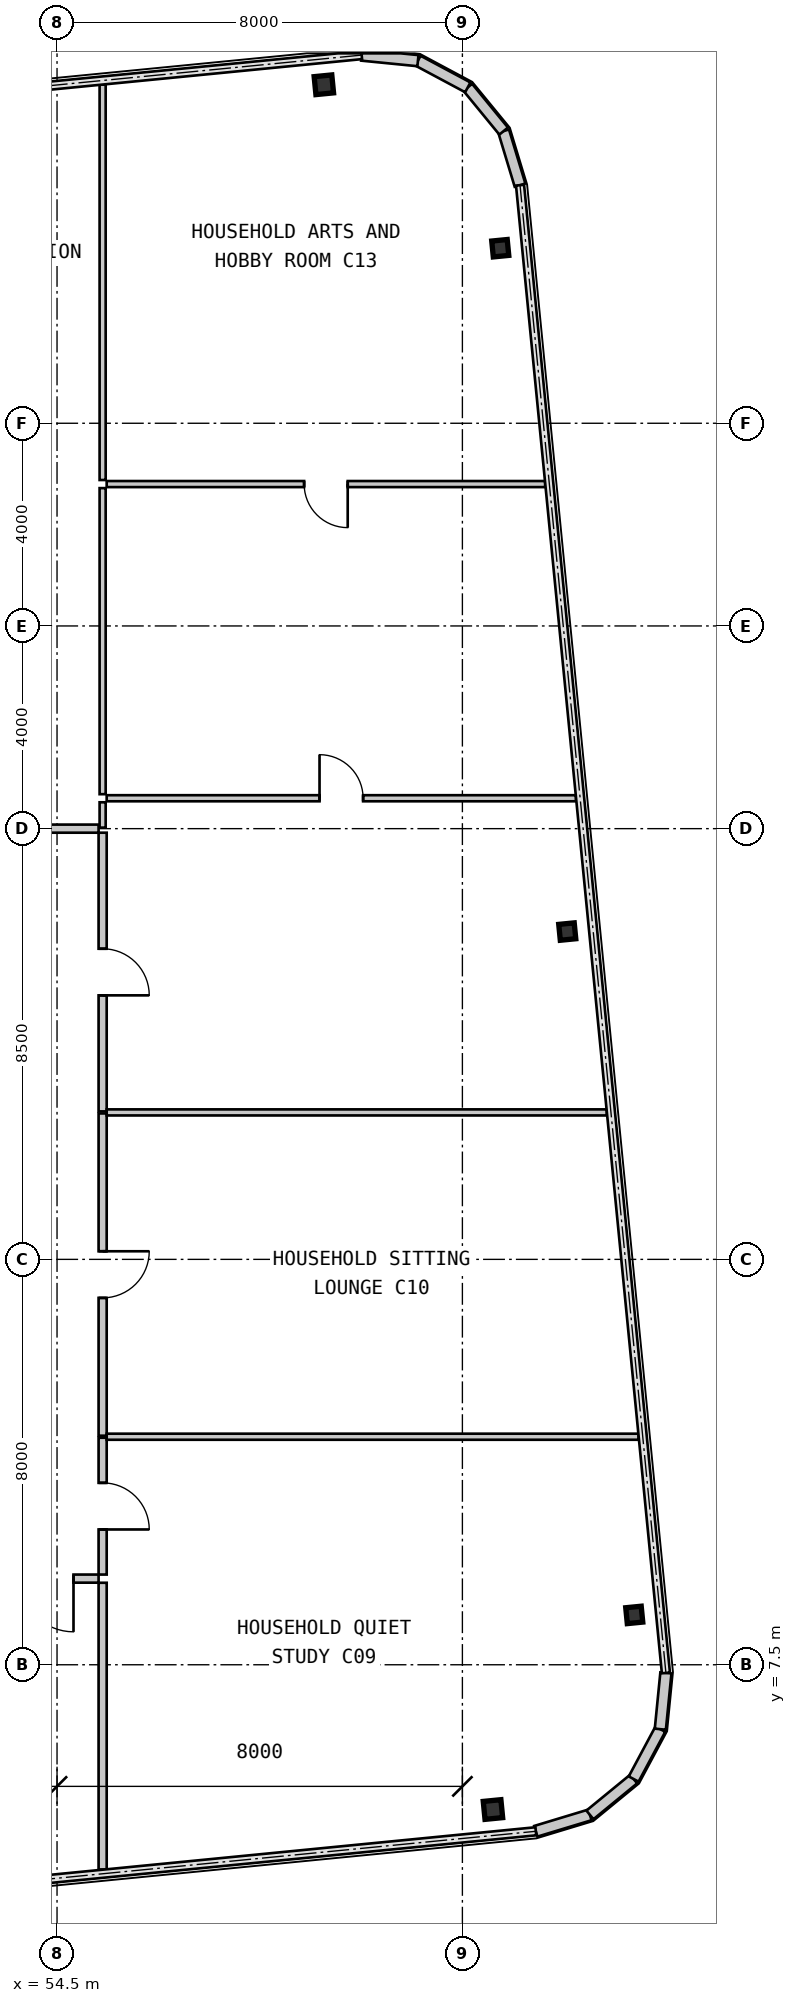
"""IFC4 building model, lengths in metres.
Left out: names, types, materials, properties, quantities, classifications, styles, units other than length and angle.
Written with IfcOpenShell. Run it as: python <this file> out.ifc"""

import sys

from ifc_helpers import new_model, si_unit, direction, frame, frame_2d, origin, origin_2d, place, context, subcontext, project, spatial, rectangle, i_section, extrude, source, transform, mapped, element, fill, save


model = new_model("IFC4")
c1 = context("Model", 3, precision=1e-05, world=origin(), true_north=direction((0.0, 1.0)))
c2 = subcontext(c1, "Body", "Model", "MODEL_VIEW")
j1 = project(units=[si_unit("LENGTHUNIT", "METRE"), si_unit("PLANEANGLEUNIT", "RADIAN")], contexts=[c1])
p1 = place(None, origin())
s1 = spatial("IfcSite", under=j1, at=p1, CompositionType="ELEMENT")
p2 = place(p1, origin())
s2 = spatial("IfcBuilding", under=s1, at=p2, CompositionType="ELEMENT")
p3 = place(p2, frame((0.0, 0.0, 74.55)))
s3 = spatial("IfcBuildingStorey", under=s2, at=p3, CompositionType="ELEMENT", Elevation=74.55)
m1 = source(origin(), c2, "Body", "SweptSolid", [
    extrude(i_section(OverallWidth=0.35, OverallDepth=0.356, WebThickness=0.018, FlangeThickness=0.028, at=origin_2d()), origin(), (0.0, 0.0, 1.0), 3.15),
])
for number, where, z_axis, x_axis in (
    (1, (63.103, 4.643, 0.0), (0.0, 0.0, 1.0), (0.995, 0.098, 0.0)),
    (2, (59.766, 38.68, 0.0), (0.0, 0.0, 1.0), (0.995, 0.098, 0.0)),
):
    element("IfcColumn", number, at=place(p3, frame(where, z_axis=z_axis, x_axis=x_axis)), inside=s3, PredefinedType="COLUMN", context=c2, shape_type="MappedRepresentation", body=[
        mapped(m1, transform((0.0, 0.0, 0.0), scale=1.0)),
    ])
m2 = source(origin(), c2, "Body", "SweptSolid", [
    extrude(i_section(OverallWidth=0.307, OverallDepth=0.315, WebThickness=0.012, FlangeThickness=0.019, at=origin_2d()), origin(), (0.0, 0.0, 1.0), 3.15),
])
for number, where, z_axis, x_axis in (
    (3, (65.892, 8.484, 0.0), (0.0, 0.0, 1.0), (0.995, 0.098, 0.0)),
    (4, (64.57, 21.969, 0.0), (0.0, 0.0, 1.0), (0.995, 0.098, 0.0)),
    (5, (63.247, 35.454, 0.0), (0.0, 0.0, 1.0), (0.995, 0.098, 0.0)),
):
    element("IfcColumn", number, at=place(p3, frame(where, z_axis=z_axis, x_axis=x_axis)), inside=s3, PredefinedType="COLUMN", context=c2, shape_type="MappedRepresentation", body=[
        mapped(m2, transform((0.0, 0.0, 0.0), scale=1.0)),
    ])
m3 = source(origin(), c2, "Body", "SweptSolid", [
    extrude(rectangle(XDim=1.116, YDim=0.22, at=frame_2d((0.558, 0.0))), origin(), (0.0, 0.0, 1.0), 2.93),
])
p4 = place(p3, frame((63.949, 4.214, 0.0), z_axis=(0.0, 0.0, 1.0), x_axis=(0.957052003726, 0.289916301997, 0.0)))
e6 = element("IfcWall", 6, at=p4, inside=s3, PredefinedType="SOLIDWALL", context=c2, shape_type="MappedRepresentation", body=[
    mapped(m3, transform((0.0, 0.0, 0.0), scale=1.0)),
])
m4 = source(origin(), c2, "Body", "SweptSolid", [
    extrude(rectangle(XDim=1.116, YDim=0.22, at=frame_2d((0.558, 0.0))), origin(), (0.0, 0.0, 1.0), 2.93),
])
p5 = place(p3, frame((65.017, 4.537, 0.0), z_axis=(0.0, 0.0, 1.0), x_axis=(0.773342870285, 0.633988016432, 0.0)))
e7 = element("IfcWall", 7, at=p5, inside=s3, PredefinedType="SOLIDWALL", context=c2, shape_type="MappedRepresentation", body=[
    mapped(m4, transform((0.0, 0.0, 0.0), scale=1.0)),
])
p6 = place(p3, frame((65.88, 5.245, 0.0), z_axis=(0.0, 0.0, 1.0), x_axis=(0.471723463201, 0.881746547635, 0.0)))
e8 = element("IfcWall", 8, at=p6, inside=s3, PredefinedType="SOLIDWALL", context=c2, shape_type="MappedRepresentation", body=[
    mapped(m3, transform((0.0, 0.0, 0.0), scale=1.0)),
])
for number, where, z_axis, x_axis in (
    (9, (66.406, 6.229, 0.0), (0.0, 0.0, 1.0), (0.098, 0.995, 0.0)),
    (10, (63.638, 36.698, 0.0), (0.0, 0.0, 1.0), (-0.29, 0.957, 0.0)),
):
    element("IfcWall", number, at=place(p3, frame(where, z_axis=z_axis, x_axis=x_axis)), inside=s3, PredefinedType="SOLIDWALL", context=c2, shape_type="MappedRepresentation", body=[
        mapped(m4, transform((0.0, 0.0, 0.0), scale=1.0)),
    ])
p7 = place(p3, frame((63.314, 37.766, 0.0), z_axis=(0.0, 0.0, 1.0), x_axis=(-0.634095287989, 0.773254916409, 0.0)))
e11 = element("IfcWall", 11, at=p7, inside=s3, PredefinedType="SOLIDWALL", context=c2, shape_type="MappedRepresentation", body=[
    mapped(m3, transform((0.0, 0.0, 0.0), scale=1.0)),
])
for number, where, z_axis, x_axis in (
    (12, (62.607, 38.629, 0.0), (0.0, 0.0, 1.0), (-0.882, 0.472, 0.0)),
    (13, (61.623, 39.156, 0.0), (0.0, 0.0, 1.0), (-0.995, 0.098, 0.0)),
):
    element("IfcWall", number, at=place(p3, frame(where, z_axis=z_axis, x_axis=x_axis)), inside=s3, PredefinedType="SOLIDWALL", context=c2, shape_type="MappedRepresentation", body=[
        mapped(m4, transform((0.0, 0.0, 0.0), scale=1.0)),
    ])
m5 = source(origin(), c2, "Body", "SweptSolid", [
    extrude(rectangle(XDim=2.04, YDim=0.16, at=frame_2d((1.02, 0.0))), origin(), (0.0, 0.0, 1.0), 2.93),
])
p8 = place(p3, frame((55.32, 9.2, 0.0), z_axis=(0.0, 0.0, 1.0), x_axis=(-1.0, 0.0, 0.0)))
e14 = element("IfcWall", 14, at=p8, inside=s3, PredefinedType="PARTITIONING", context=c2, shape_type="MappedRepresentation", body=[
    mapped(m5, transform((0.0, 0.0, 0.0), scale=1.0)),
])
m6 = source(origin(), c2, "Body", "SweptSolid", [
    extrude(rectangle(XDim=1.05, YDim=2.1, at=frame_2d((0.525, 1.05))), frame((0.0, 0.09, 0.0), z_axis=(0.0, -1.0, 0.0), x_axis=(1.0, 0.0, 0.0)), (0.0, 0.0, 1.0), 0.18),
])
p9 = place(p8, frame((0.495, 0.0, 0.0)))
e15 = element("IfcOpeningElement", 15, at=p9, cuts=e14, PredefinedType="OPENING", context=c2, shape_type="MappedRepresentation", body=[
    mapped(m6, transform((0.0, 0.0, 0.0), scale=1.0)),
])
m7 = source(origin(), c2, "Body", "SweptSolid", [
    extrude(rectangle(XDim=2.7, YDim=0.16, at=frame_2d((1.35, 0.0))), origin(), (0.0, 0.0, 1.0), 2.93),
])
p10 = place(p3, frame((55.4, 11.98, 0.0), z_axis=(0.0, 0.0, 1.0), x_axis=(0.0, -1.0, 0.0)))
e16 = element("IfcWall", 16, at=p10, inside=s3, PredefinedType="PARTITIONING", context=c2, shape_type="MappedRepresentation", body=[
    mapped(m7, transform((0.0, 0.0, 0.0), scale=1.0)),
])
m8 = source(origin(), c2, "Body", "SweptSolid", [
    extrude(rectangle(XDim=0.92, YDim=2.1, at=frame_2d((0.46, 1.05))), frame((0.0, 0.09, 0.0), z_axis=(0.0, -1.0, 0.0), x_axis=(1.0, 0.0, 0.0)), (0.0, 0.0, 1.0), 0.18),
])
p11 = place(p10, frame((0.89, 0.0, 0.0)))
e17 = element("IfcOpeningElement", 17, at=p11, cuts=e16, PredefinedType="OPENING", context=c2, shape_type="MappedRepresentation", body=[
    mapped(m8, transform((0.0, 0.0, 0.0), scale=1.0)),
])
m9 = source(origin(), c2, "Body", "SweptSolid", [
    extrude(rectangle(XDim=6.36, YDim=0.16, at=frame_2d((3.18, 0.0))), origin(), (0.0, 0.0, 1.0), 2.93),
])
p12 = place(p3, frame((55.4, 18.38, 0.0), z_axis=(0.0, 0.0, 1.0), x_axis=(0.0, -1.0, 0.0)))
e18 = element("IfcWall", 18, at=p12, inside=s3, PredefinedType="PARTITIONING", context=c2, shape_type="MappedRepresentation", body=[
    mapped(m9, transform((0.0, 0.0, 0.0), scale=1.0)),
])
p13 = place(p12, frame((2.72, 0.0, 0.0)))
e19 = element("IfcOpeningElement", 19, at=p13, cuts=e18, PredefinedType="OPENING", context=c2, shape_type="MappedRepresentation", body=[
    mapped(m8, transform((0.0, 0.0, 0.0), scale=1.0)),
])
m10 = source(origin(), c2, "Body", "SweptSolid", [
    extrude(rectangle(XDim=5.5, YDim=0.16, at=frame_2d((2.75, 0.0))), origin(), (0.0, 0.0, 1.0), 2.93),
])
p14 = place(p3, frame((55.4, 23.92, 0.0), z_axis=(0.0, 0.0, 1.0), x_axis=(0.0, -1.0, 0.0)))
e20 = element("IfcWall", 20, at=p14, inside=s3, PredefinedType="PARTITIONING", context=c2, shape_type="MappedRepresentation", body=[
    mapped(m10, transform((0.0, 0.0, 0.0), scale=1.0)),
])
p15 = place(p14, frame((2.29, 0.0, 0.0)))
e21 = element("IfcOpeningElement", 21, at=p15, cuts=e20, PredefinedType="OPENING", context=c2, shape_type="MappedRepresentation", body=[
    mapped(m8, transform((0.0, 0.0, 0.0), scale=1.0)),
])
m11 = source(origin(), c2, "Body", "SweptSolid", [
    extrude(rectangle(XDim=3.016, YDim=0.16, at=frame_2d((1.508, 0.0))), origin(), (0.0, 0.0, 1.0), 2.93),
])
p16 = place(p3, frame((52.304, 24.0, 0.0), z_axis=(0.0, 0.0, 1.0), x_axis=(1.0, 0.0, 0.0)))
e22 = element("IfcWall", 22, at=p16, inside=s3, PredefinedType="PARTITIONING", context=c2, shape_type="MappedRepresentation", body=[
    mapped(m11, transform((0.0, 0.0, 0.0), scale=1.0)),
])
m12 = source(origin(), c2, "Body", "SweptSolid", [
    extrude(rectangle(XDim=5.658, YDim=0.16, at=frame_2d((2.829, 0.0))), origin(), (0.0, 0.0, 1.0), 2.93),
])
p17 = place(p3, frame((55.4, 9.118, 0.0), z_axis=(0.0, 0.0, 1.0), x_axis=(0.0, -1.0, 0.0)))
e23 = element("IfcWall", 23, at=p17, inside=s3, PredefinedType="PARTITIONING", context=c2, shape_type="MappedRepresentation", body=[
    mapped(m12, transform((0.0, 0.0, 0.0), scale=1.0)),
])
m13 = source(origin(), c2, "Body", "SweptSolid", [
    extrude(rectangle(XDim=10.497, YDim=0.12, at=frame_2d((5.249, 0.0))), origin(), (0.0, 0.0, 1.0), 2.93),
])
p18 = place(p3, frame((55.48, 12.0, 0.0), z_axis=(0.0, 0.0, 1.0), x_axis=(1.0, 0.0, 0.0)))
e24 = element("IfcWall", 24, at=p18, inside=s3, PredefinedType="PARTITIONING", context=c2, shape_type="MappedRepresentation", body=[
    mapped(m13, transform((0.0, 0.0, 0.0), scale=1.0)),
])
m14 = source(origin(), c2, "Body", "SweptSolid", [
    extrude(rectangle(XDim=9.869, YDim=0.12, at=frame_2d((4.935, 0.0))), origin(), (0.0, 0.0, 1.0), 2.93),
])
p19 = place(p3, frame((55.48, 18.4, 0.0), z_axis=(0.0, 0.0, 1.0), x_axis=(1.0, 0.0, 0.0)))
e25 = element("IfcWall", 25, at=p19, inside=s3, PredefinedType="PARTITIONING", context=c2, shape_type="MappedRepresentation", body=[
    mapped(m14, transform((0.0, 0.0, 0.0), scale=1.0)),
])
m15 = source(origin(), c2, "Body", "SweptSolid", [
    extrude(rectangle(XDim=9.261, YDim=0.12, at=frame_2d((4.631, 0.0))), origin(), (0.0, 0.0, 1.0), 2.93),
])
p20 = place(p3, frame((55.48, 24.6, 0.0), z_axis=(0.0, 0.0, 1.0), x_axis=(1.0, 0.0, 0.0)))
e26 = element("IfcWall", 26, at=p20, inside=s3, PredefinedType="PARTITIONING", context=c2, shape_type="MappedRepresentation", body=[
    mapped(m15, transform((0.0, 0.0, 0.0), scale=1.0)),
])
m16 = source(origin(), c2, "Body", "SweptSolid", [
    extrude(rectangle(XDim=0.86, YDim=2.1, at=frame_2d((0.43, 1.05))), frame((0.0, 0.07, 0.0), z_axis=(0.0, -1.0, 0.0), x_axis=(1.0, 0.0, 0.0)), (0.0, 0.0, 1.0), 0.14),
])
p21 = place(p20, frame((4.201, 0.0, 0.0)))
e27 = element("IfcOpeningElement", 27, at=p21, cuts=e26, PredefinedType="OPENING", context=c2, shape_type="MappedRepresentation", body=[
    mapped(m16, transform((0.0, 0.0, 0.0), scale=1.0)),
])
m17 = source(origin(), c2, "Body", "SweptSolid", [
    extrude(rectangle(XDim=0.5, YDim=0.12, at=frame_2d((0.25, 0.0))), origin(), (0.0, 0.0, 1.0), 2.93),
])
p22 = place(p3, frame((55.4, 24.02, 0.0), z_axis=(0.0, 0.0, 1.0), x_axis=(0.0, 1.0, 0.0)))
e28 = element("IfcWall", 28, at=p22, inside=s3, PredefinedType="PARTITIONING", context=c2, shape_type="MappedRepresentation", body=[
    mapped(m17, transform((0.0, 0.0, 0.0), scale=1.0)),
])
m18 = source(origin(), c2, "Body", "SweptSolid", [
    extrude(rectangle(XDim=8.653, YDim=0.12, at=frame_2d((4.327, 0.0))), origin(), (0.0, 0.0, 1.0), 2.93),
])
p23 = place(p3, frame((55.48, 30.8, 0.0), z_axis=(0.0, 0.0, 1.0), x_axis=(1.0, 0.0, 0.0)))
e29 = element("IfcWall", 29, at=p23, inside=s3, PredefinedType="PARTITIONING", context=c2, shape_type="MappedRepresentation", body=[
    mapped(m18, transform((0.0, 0.0, 0.0), scale=1.0)),
])
p24 = place(p23, frame((3.897, 0.0, 0.0)))
e30 = element("IfcOpeningElement", 30, at=p24, cuts=e29, PredefinedType="OPENING", context=c2, shape_type="MappedRepresentation", body=[
    mapped(m16, transform((0.0, 0.0, 0.0), scale=1.0)),
])
m19 = source(origin(), c2, "Body", "SweptSolid", [
    extrude(rectangle(XDim=6.04, YDim=0.12, at=frame_2d((3.02, 0.0))), origin(), (0.0, 0.0, 1.0), 2.93),
])
p25 = place(p3, frame((55.4, 24.68, 0.0), z_axis=(0.0, 0.0, 1.0), x_axis=(0.0, 1.0, 0.0)))
e31 = element("IfcWall", 31, at=p25, inside=s3, PredefinedType="PARTITIONING", context=c2, shape_type="MappedRepresentation", body=[
    mapped(m19, transform((0.0, 0.0, 0.0), scale=1.0)),
])
m20 = source(origin(), c2, "Body", "SweptSolid", [
    extrude(rectangle(XDim=7.802, YDim=0.12, at=frame_2d((3.901, 0.0))), origin(), (0.0, 0.0, 1.0), 2.93),
])
p26 = place(p3, frame((55.4, 30.88, 0.0), z_axis=(0.0, 0.0, 1.0), x_axis=(0.0, 1.0, 0.0)))
e32 = element("IfcWall", 32, at=p26, inside=s3, PredefinedType="PARTITIONING", context=c2, shape_type="MappedRepresentation", body=[
    mapped(m20, transform((0.0, 0.0, 0.0), scale=1.0)),
])
m21 = source(origin(), c2, "Body", "SweptSolid", [
    extrude(rectangle(XDim=1.05, YDim=2.1, at=frame_2d((0.525, 1.05))), frame((0.0, 0.025, 0.0), z_axis=(0.0, -1.0, 0.0), x_axis=(1.0, 0.0, 0.0)), (0.0, 0.0, 1.0), 0.05),
])
p27 = place(p9, origin())
e33 = element("IfcDoor", 33, at=p27, inside=s3, OperationType="SINGLE_SWING_LEFT", PredefinedType="DOOR", context=c2, shape_type="MappedRepresentation", body=[
    mapped(m21, transform((0.0, 0.0, 0.0), scale=1.0)),
])
fill(e15, e33)
m22 = source(origin(), c2, "Body", "SweptSolid", [
    extrude(rectangle(XDim=0.92, YDim=2.1, at=frame_2d((0.46, 1.05))), frame((0.0, 0.025, 0.0), z_axis=(0.0, -1.0, 0.0), x_axis=(1.0, 0.0, 0.0)), (0.0, 0.0, 1.0), 0.05),
])
p28 = place(p11, origin())
e34 = element("IfcDoor", 34, at=p28, inside=s3, OperationType="SINGLE_SWING_RIGHT", PredefinedType="DOOR", context=c2, shape_type="MappedRepresentation", body=[
    mapped(m22, transform((0.0, 0.0, 0.0), scale=1.0)),
])
fill(e17, e34)
p29 = place(p13, origin())
e35 = element("IfcDoor", 35, at=p29, inside=s3, OperationType="SINGLE_SWING_LEFT", PredefinedType="DOOR", context=c2, shape_type="MappedRepresentation", body=[
    mapped(m22, transform((0.0, 0.0, 0.0), scale=1.0)),
])
fill(e19, e35)
p30 = place(p15, origin())
e36 = element("IfcDoor", 36, at=p30, inside=s3, OperationType="SINGLE_SWING_RIGHT", PredefinedType="DOOR", context=c2, shape_type="MappedRepresentation", body=[
    mapped(m22, transform((0.0, 0.0, 0.0), scale=1.0)),
])
fill(e21, e36)
m23 = source(origin(), c2, "Body", "SweptSolid", [
    extrude(rectangle(XDim=0.86, YDim=2.1, at=frame_2d((0.43, 1.05))), frame((0.0, 0.025, 0.0), z_axis=(0.0, -1.0, 0.0), x_axis=(1.0, 0.0, 0.0)), (0.0, 0.0, 1.0), 0.05),
])
p31 = place(p21, origin())
e37 = element("IfcDoor", 37, at=p31, inside=s3, OperationType="SINGLE_SWING_LEFT", PredefinedType="DOOR", context=c2, shape_type="MappedRepresentation", body=[
    mapped(m23, transform((0.0, 0.0, 0.0), scale=1.0)),
])
fill(e27, e37)
p32 = place(p24, frame((0.86, 0.0, 0.0), z_axis=(0.0, 0.0, 1.0), x_axis=(-1.0, 0.0, 0.0)))
e38 = element("IfcDoor", 38, at=p32, inside=s3, OperationType="SINGLE_SWING_LEFT", PredefinedType="DOOR", context=c2, shape_type="MappedRepresentation", body=[
    mapped(m23, transform((0.0, 0.0, 0.0), scale=1.0)),
])
fill(e30, e38)
save(model, sys.argv[1])
